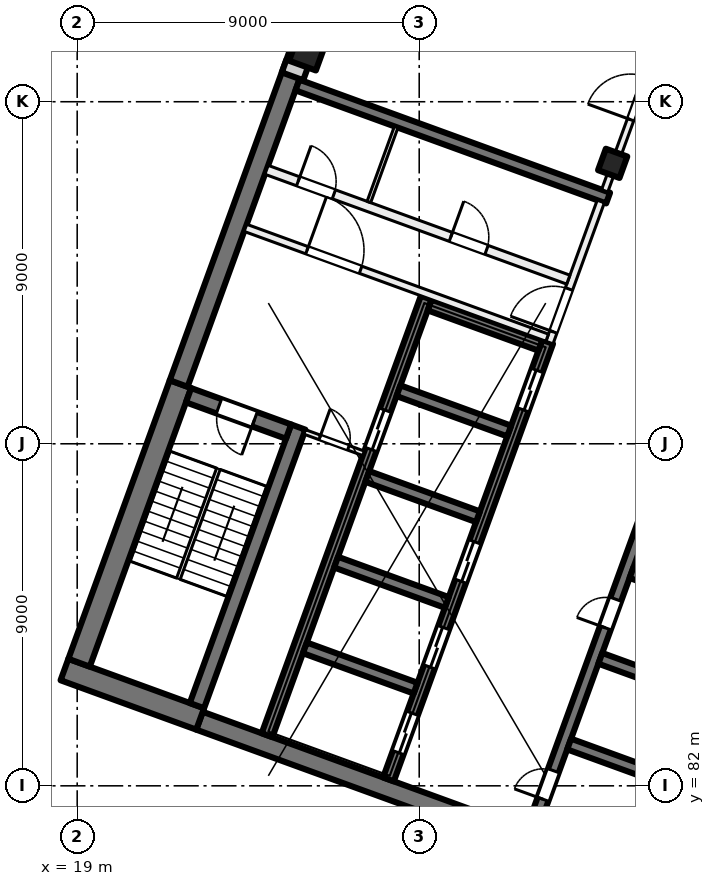
"""IFC4 building model, lengths in metres.
Left out: names, types, materials, properties, quantities, classifications, styles, units other than length and angle.
Written with IfcOpenShell. Run it as: python <this file> out.ifc"""

import sys

from ifc_helpers import new_model, si_unit, direction, frame, frame_2d, origin, origin_2d, place, context, subcontext, project, spatial, rectangle, extrude, element, fill, save


model = new_model("IFC4")
c1 = context("Model", 3, precision=1e-05, world=origin(), true_north=direction((0.0, 1.0)))
c2 = subcontext(c1, "Body", "Model", "MODEL_VIEW")
j1 = project(units=[si_unit("LENGTHUNIT", "METRE"), si_unit("PLANEANGLEUNIT", "RADIAN")], contexts=[c1])
p1 = place(None, origin())
s1 = spatial("IfcSite", under=j1, at=p1, CompositionType="ELEMENT")
p2 = place(p1, origin())
s2 = spatial("IfcBuilding", under=s1, at=p2, CompositionType="ELEMENT")
p3 = place(p2, frame((0.0, 0.0, 228.0)))
s3 = spatial("IfcBuildingStorey", under=s2, at=p3, CompositionType="ELEMENT", Elevation=228.0)
p4 = place(p3, frame((33.091, 98.379, 0.0), z_axis=(0.0, 0.0, 1.0), x_axis=(-0.342020143326, -0.939692620786, 0.0)))
e1 = element("IfcColumn", 1, at=p4, inside=s3, PredefinedType="COLUMN", context=c2, shape_type="SweptSolid", body=[
    extrude(rectangle(XDim=0.6, YDim=0.6, at=origin_2d()), origin(), (0.0, 0.0, 1.0), 4.0),
])
p5 = place(p3, frame((25.056, 101.303, 0.0), z_axis=(0.0, 0.0, 1.0), x_axis=(-0.342020143326, -0.939692620786, 0.0)))
e2 = element("IfcColumn", 2, at=p5, inside=s3, PredefinedType="COLUMN", context=c2, shape_type="SweptSolid", body=[
    extrude(rectangle(XDim=0.75, YDim=0.75, at=origin_2d()), origin(), (0.0, 0.0, 1.0), 4.0),
])
p6 = place(p3, frame((35.75, 78.788, 0.0), z_axis=(0.0, 0.0, 1.0), x_axis=(-0.939692894512, 0.342019391267, 0.0)))
e3 = element("IfcWall", 3, at=p6, inside=s3, PredefinedType="SHEAR", context=c2, shape_type="SweptSolid", body=[
    extrude(rectangle(XDim=14.4, YDim=0.5, at=frame_2d((7.2, 0.0))), origin(), (0.0, 0.0, 1.0), 4.0),
])
p7 = place(p3, frame((22.236, 83.76, 0.0), z_axis=(0.0, 0.0, 1.0), x_axis=(-0.939680822529, 0.342052557032, 0.0)))
e4 = element("IfcWall", 4, at=p7, inside=s3, PredefinedType="SHEAR", context=c2, shape_type="SweptSolid", body=[
    extrude(rectangle(XDim=3.8, YDim=0.6, at=frame_2d((1.9, 0.0))), origin(), (0.0, 0.0, 1.0), 4.0),
])
p8 = place(p3, frame((19.05, 85.239, 0.0), z_axis=(0.0, 0.0, 1.0), x_axis=(0.342016982193, 0.939693771338, 0.0)))
e5 = element("IfcWall", 5, at=p8, inside=s3, PredefinedType="SHEAR", context=c2, shape_type="SweptSolid", body=[
    extrude(rectangle(XDim=7.8, YDim=0.6, at=frame_2d((3.9, 0.0))), origin(), (0.0, 0.0, 1.0), 4.0),
])
p9 = place(p3, frame((21.67, 92.585, 0.0), z_axis=(0.0, 0.0, 1.0), x_axis=(0.342035714298, 0.93968695327, 0.0)))
e6 = element("IfcWall", 6, at=p9, inside=s3, PredefinedType="SHEAR", context=c2, shape_type="SweptSolid", body=[
    extrude(rectangle(XDim=8.975, YDim=0.5, at=frame_2d((4.488, 0.0))), origin(), (0.0, 0.0, 1.0), 4.0),
])
p10 = place(p3, frame((22.15, 84.11, 0.0), z_axis=(0.0, 0.0, 1.0), x_axis=(0.342016982193, 0.939693771338, 0.0)))
e7 = element("IfcWall", 7, at=p10, inside=s3, PredefinedType="SHEAR", context=c2, shape_type="SweptSolid", body=[
    extrude(rectangle(XDim=7.8, YDim=0.4, at=frame_2d((3.9, 0.0))), origin(), (0.0, 0.0, 1.0), 4.0),
])
p11 = place(p3, frame((24.562, 91.32, 0.0), z_axis=(0.0, 0.0, 1.0), x_axis=(-0.939717030584, 0.341953070509, 0.0)))
e8 = element("IfcWall", 8, at=p11, inside=s3, PredefinedType="SHEAR", context=c2, shape_type="SweptSolid", body=[
    extrude(rectangle(XDim=2.8, YDim=0.4, at=frame_2d((1.4, 0.0))), origin(), (0.0, 0.0, 1.0), 4.0),
])
p12 = place(p11, frame((0.95, 0.0, 0.0)))
e9 = element("IfcOpeningElement", 9, at=p12, cuts=e8, PredefinedType="OPENING", context=c2, shape_type="SweptSolid", body=[
    extrude(rectangle(XDim=1.0, YDim=2.1, at=frame_2d((0.5, 1.05))), frame((0.0, 0.21, 0.0), z_axis=(0.0, -1.0, 0.0), x_axis=(1.0, 0.0, 0.0)), (0.0, 0.0, 1.0), 0.42),
])
p13 = place(p3, frame((30.949, 80.801, 0.0), z_axis=(0.0, 0.0, 1.0), x_axis=(0.342016684409, 0.939693879721, 0.0)))
e10 = element("IfcWall", 10, at=p13, inside=s3, PredefinedType="SHEAR", context=c2, shape_type="SweptSolid", body=[
    extrude(rectangle(XDim=12.25, YDim=0.3, at=frame_2d((6.125, 0.0))), origin(), (0.0, 0.0, 1.0), 4.0),
])
p14 = place(p13, frame((0.9, 0.0, 0.0)))
e11 = element("IfcOpeningElement", 11, at=p14, cuts=e10, PredefinedType="OPENING", context=c2, shape_type="SweptSolid", body=[
    extrude(rectangle(XDim=0.8, YDim=2.1, at=frame_2d((0.4, 1.05))), frame((0.0, 0.16, 0.0), z_axis=(0.0, -1.0, 0.0), x_axis=(1.0, 0.0, 0.0)), (0.0, 0.0, 1.0), 0.32),
])
p15 = place(p13, frame((5.7, 0.0, 0.0)))
e12 = element("IfcOpeningElement", 12, at=p15, cuts=e10, PredefinedType="OPENING", context=c2, shape_type="SweptSolid", body=[
    extrude(rectangle(XDim=0.8, YDim=2.1, at=frame_2d((0.4, 1.05))), frame((0.0, 0.16, 0.0), z_axis=(0.0, -1.0, 0.0), x_axis=(1.0, 0.0, 0.0)), (0.0, 0.0, 1.0), 0.32),
])
p16 = place(p3, frame((34.858, 82.039, 0.0), z_axis=(0.0, 0.0, 1.0), x_axis=(-0.939689908313, 0.342027595692, 0.0)))
e13 = element("IfcWall", 13, at=p16, inside=s3, PredefinedType="SHEAR", context=c2, shape_type="SweptSolid", body=[
    extrude(rectangle(XDim=3.1, YDim=0.3, at=frame_2d((1.55, 0.0))), origin(), (0.0, 0.0, 1.0), 4.0),
])
p17 = place(p3, frame((35.679, 84.294, 0.0), z_axis=(0.0, 0.0, 1.0), x_axis=(-0.939706007505, 0.341983361377, 0.0)))
e14 = element("IfcWall", 14, at=p17, inside=s3, PredefinedType="SHEAR", context=c2, shape_type="SweptSolid", body=[
    extrude(rectangle(XDim=3.1, YDim=0.3, at=frame_2d((1.55, 0.0))), origin(), (0.0, 0.0, 1.0), 4.0),
])
p18 = place(p3, frame((36.5, 86.549, 0.0), z_axis=(0.0, 0.0, 1.0), x_axis=(-0.939689908313, 0.342027595692, 0.0)))
e15 = element("IfcWall", 15, at=p18, inside=s3, PredefinedType="SHEAR", context=c2, shape_type="SweptSolid", body=[
    extrude(rectangle(XDim=3.1, YDim=0.3, at=frame_2d((1.55, 0.0))), origin(), (0.0, 0.0, 1.0), 4.0),
])
p19 = place(p3, frame((27.191, 82.169, 0.0), z_axis=(0.0, 0.0, 1.0), x_axis=(0.342016684409, 0.939693879721, 0.0)))
e16 = element("IfcWall", 16, at=p19, inside=s3, PredefinedType="SHEAR", context=c2, shape_type="SweptSolid", body=[
    extrude(rectangle(XDim=12.25, YDim=0.3, at=frame_2d((6.125, 0.0))), origin(), (0.0, 0.0, 1.0), 4.0),
])
p20 = place(p19, frame((0.75, 0.0, 0.0)))
e17 = element("IfcOpeningElement", 17, at=p20, cuts=e16, PredefinedType="OPENING", context=c2, shape_type="SweptSolid", body=[
    extrude(rectangle(XDim=1.1, YDim=2.1, at=frame_2d((0.55, 1.05))), frame((0.0, 0.16, 0.0), z_axis=(0.0, -1.0, 0.0), x_axis=(1.0, 0.0, 0.0)), (0.0, 0.0, 1.0), 0.32),
])
p21 = place(p19, frame((3.15, 0.0, 0.0)))
e18 = element("IfcOpeningElement", 18, at=p21, cuts=e16, PredefinedType="OPENING", context=c2, shape_type="SweptSolid", body=[
    extrude(rectangle(XDim=1.1, YDim=2.1, at=frame_2d((0.55, 1.05))), frame((0.0, 0.16, 0.0), z_axis=(0.0, -1.0, 0.0), x_axis=(1.0, 0.0, 0.0)), (0.0, 0.0, 1.0), 0.32),
])
p22 = place(p19, frame((5.55, 0.0, 0.0)))
e19 = element("IfcOpeningElement", 19, at=p22, cuts=e16, PredefinedType="OPENING", context=c2, shape_type="SweptSolid", body=[
    extrude(rectangle(XDim=1.1, YDim=2.1, at=frame_2d((0.55, 1.05))), frame((0.0, 0.16, 0.0), z_axis=(0.0, -1.0, 0.0), x_axis=(1.0, 0.0, 0.0)), (0.0, 0.0, 1.0), 0.32),
])
p23 = place(p19, frame((10.35, 0.0, 0.0)))
e20 = element("IfcOpeningElement", 20, at=p23, cuts=e16, PredefinedType="OPENING", context=c2, shape_type="SweptSolid", body=[
    extrude(rectangle(XDim=1.1, YDim=2.1, at=frame_2d((0.55, 1.05))), frame((0.0, 0.16, 0.0), z_axis=(0.0, -1.0, 0.0), x_axis=(1.0, 0.0, 0.0)), (0.0, 0.0, 1.0), 0.32),
])
p24 = place(p3, frame((23.996, 83.332, 0.0), z_axis=(0.0, 0.0, 1.0), x_axis=(0.342016684409, 0.939693879721, 0.0)))
e21 = element("IfcWall", 21, at=p24, inside=s3, PredefinedType="SHEAR", context=c2, shape_type="SweptSolid", body=[
    extrude(rectangle(XDim=12.25, YDim=0.3, at=frame_2d((6.125, 0.0))), origin(), (0.0, 0.0, 1.0), 4.0),
])
p25 = place(p24, frame((8.0, 0.0, 0.0)))
e22 = element("IfcOpeningElement", 22, at=p25, cuts=e21, PredefinedType="OPENING", context=c2, shape_type="SweptSolid", body=[
    extrude(rectangle(XDim=1.1, YDim=2.1, at=frame_2d((0.55, 1.05))), frame((0.0, 0.16, 0.0), z_axis=(0.0, -1.0, 0.0), x_axis=(1.0, 0.0, 0.0)), (0.0, 0.0, 1.0), 0.32),
])
for number, where, z_axis, x_axis in (
    (23, (27.905, 84.57, 0.0), (0.0, 0.0, 1.0), (-0.94, 0.342, 0.0)),
    (24, (28.726, 86.825, 0.0), (0.0, 0.0, 1.0), (-0.94, 0.342, 0.0)),
    (25, (29.546, 89.08, 0.0), (0.0, 0.0, 1.0), (-0.94, 0.342, 0.0)),
):
    element("IfcWall", number, at=place(p3, frame(where, z_axis=z_axis, x_axis=x_axis)), inside=s3, PredefinedType="SHEAR", context=c2, shape_type="SweptSolid", body=[
        extrude(rectangle(XDim=3.1, YDim=0.3, at=frame_2d((1.55, 0.0))), origin(), (0.0, 0.0, 1.0), 4.0),
    ])
for number, where, z_axis, x_axis in (
    (26, (30.367, 91.336, 0.0), (0.0, 0.0, 1.0), (-0.94, 0.342, 0.0)),
    (27, (31.188, 93.591, 0.0), (0.0, 0.0, 1.0), (-0.94, 0.342, 0.0)),
):
    element("IfcWall", number, at=place(p3, frame(where, z_axis=z_axis, x_axis=x_axis)), inside=s3, PredefinedType="SHEAR", context=c2, shape_type="SweptSolid", body=[
        extrude(rectangle(XDim=3.1, YDim=0.3, at=frame_2d((1.55, 0.0))), origin(), (0.0, 0.0, 1.0), 4.0),
    ])
p26 = place(p3, frame((32.971, 97.465, 0.0), z_axis=(0.0, 0.0, 1.0), x_axis=(-0.939695066972, 0.34201342241, 0.0)))
e28 = element("IfcWall", 28, at=p26, inside=s3, PredefinedType="SHEAR", context=c2, shape_type="SweptSolid", body=[
    extrude(rectangle(XDim=8.7, YDim=0.3, at=frame_2d((4.35, 0.0))), origin(), (0.0, 0.0, 1.0), 4.0),
])
p27 = place(p3, frame((24.666, 100.669, 0.0), z_axis=(0.0, 0.0, 1.0), x_axis=(0.34201964167, 0.939692803373, 0.0)))
e29 = element("IfcWall", 29, at=p27, inside=s3, PredefinedType="SOLIDWALL", context=c2, shape_type="SweptSolid", body=[
    extrude(rectangle(XDim=32.884, YDim=0.6, at=frame_2d((16.442, 0.0))), origin(), (0.0, 0.0, 1.0), 3.625),
])
p28 = place(p27, frame((1.48, 0.0, 0.9)))
e30 = element("IfcOpeningElement", 30, at=p28, cuts=e29, PredefinedType="OPENING", context=c2, shape_type="SweptSolid", body=[
    extrude(rectangle(XDim=3.0, YDim=2.4, at=frame_2d((1.5, 1.2))), frame((0.0, 0.31, 0.0), z_axis=(0.0, -1.0, 0.0), x_axis=(1.0, 0.0, 0.0)), (0.0, 0.0, 1.0), 0.62),
])
p29 = place(p27, frame((5.98, 0.0, 0.9)))
e31 = element("IfcOpeningElement", 31, at=p29, cuts=e29, PredefinedType="OPENING", context=c2, shape_type="SweptSolid", body=[
    extrude(rectangle(XDim=3.0, YDim=2.4, at=frame_2d((1.5, 1.2))), frame((0.0, 0.31, 0.0), z_axis=(0.0, -1.0, 0.0), x_axis=(1.0, 0.0, 0.0)), (0.0, 0.0, 1.0), 0.62),
])
p30 = place(p27, frame((10.48, 0.0, 0.9)))
e32 = element("IfcOpeningElement", 32, at=p30, cuts=e29, PredefinedType="OPENING", context=c2, shape_type="SweptSolid", body=[
    extrude(rectangle(XDim=3.0, YDim=2.4, at=frame_2d((1.5, 1.2))), frame((0.0, 0.31, 0.0), z_axis=(0.0, -1.0, 0.0), x_axis=(1.0, 0.0, 0.0)), (0.0, 0.0, 1.0), 0.62),
])
p31 = place(p27, frame((14.98, 0.0, 0.9)))
e33 = element("IfcOpeningElement", 33, at=p31, cuts=e29, PredefinedType="OPENING", context=c2, shape_type="SweptSolid", body=[
    extrude(rectangle(XDim=3.0, YDim=2.4, at=frame_2d((1.5, 1.2))), frame((0.0, 0.31, 0.0), z_axis=(0.0, -1.0, 0.0), x_axis=(1.0, 0.0, 0.0)), (0.0, 0.0, 1.0), 0.62),
])
p32 = place(p27, frame((20.08, 0.0, 0.0)))
e34 = element("IfcOpeningElement", 34, at=p32, cuts=e29, PredefinedType="OPENING", context=c2, shape_type="SweptSolid", body=[
    extrude(rectangle(XDim=1.8, YDim=2.4, at=frame_2d((0.9, 1.2))), frame((0.0, 0.31, 0.0), z_axis=(0.0, -1.0, 0.0), x_axis=(1.0, 0.0, 0.0)), (0.0, 0.0, 1.0), 0.62),
])
p33 = place(p27, frame((23.98, 0.0, 0.9)))
e35 = element("IfcOpeningElement", 35, at=p33, cuts=e29, PredefinedType="OPENING", context=c2, shape_type="SweptSolid", body=[
    extrude(rectangle(XDim=3.0, YDim=2.4, at=frame_2d((1.5, 1.2))), frame((0.0, 0.31, 0.0), z_axis=(0.0, -1.0, 0.0), x_axis=(1.0, 0.0, 0.0)), (0.0, 0.0, 1.0), 0.62),
])
p34 = place(p27, frame((28.48, 0.0, 0.9)))
e36 = element("IfcOpeningElement", 36, at=p34, cuts=e29, PredefinedType="OPENING", context=c2, shape_type="SweptSolid", body=[
    extrude(rectangle(XDim=3.0, YDim=2.4, at=frame_2d((1.5, 1.2))), frame((0.0, 0.31, 0.0), z_axis=(0.0, -1.0, 0.0), x_axis=(1.0, 0.0, 0.0)), (0.0, 0.0, 1.0), 0.62),
])
p35 = place(p3, frame((31.427, 93.663, 0.0), z_axis=(0.0, 0.0, 1.0), x_axis=(0.342030870568, 0.93968871632, 0.0)))
e37 = element("IfcWall", 37, at=p35, inside=s3, PredefinedType="PARTITIONING", context=c2, shape_type="SweptSolid", body=[
    extrude(rectangle(XDim=3.95, YDim=0.2, at=frame_2d((1.975, 0.0))), origin(), (0.0, 0.0, 1.0), 3.625),
])
p36 = place(p35, frame((0.3, 0.0, 0.0)))
e38 = element("IfcOpeningElement", 38, at=p36, cuts=e37, PredefinedType="OPENING", context=c2, shape_type="SweptSolid", body=[
    extrude(rectangle(XDim=1.2, YDim=2.1, at=frame_2d((0.6, 1.05))), frame((0.0, 0.11, 0.0), z_axis=(0.0, -1.0, 0.0), x_axis=(1.0, 0.0, 0.0)), (0.0, 0.0, 1.0), 0.22),
])
p37 = place(p3, frame((23.427, 96.682, 0.0), z_axis=(0.0, 0.0, 1.0), x_axis=(0.939690465531, -0.342026064782, 0.0)))
e39 = element("IfcWall", 39, at=p37, inside=s3, PredefinedType="PARTITIONING", context=c2, shape_type="SweptSolid", body=[
    extrude(rectangle(XDim=8.45, YDim=0.2, at=frame_2d((4.225, 0.0))), origin(), (0.0, 0.0, 1.0), 3.625),
])
p38 = place(p37, frame((1.725, 0.0, 0.0)))
e40 = element("IfcOpeningElement", 40, at=p38, cuts=e39, PredefinedType="OPENING", context=c2, shape_type="SweptSolid", body=[
    extrude(rectangle(XDim=1.5, YDim=2.1, at=frame_2d((0.75, 1.05))), frame((0.0, 0.11, 0.0), z_axis=(0.0, -1.0, 0.0), x_axis=(1.0, 0.0, 0.0)), (0.0, 0.0, 1.0), 0.22),
])
p39 = place(p3, frame((23.983, 98.208, 0.0), z_axis=(0.0, 0.0, 1.0), x_axis=(0.939699751196, -0.342000552051, 0.0)))
e41 = element("IfcWall", 41, at=p39, inside=s3, PredefinedType="PARTITIONING", context=c2, shape_type="SweptSolid", body=[
    extrude(rectangle(XDim=8.45, YDim=0.25, at=frame_2d((4.225, 0.0))), origin(), (0.0, 0.0, 1.0), 3.625),
])
p40 = place(p39, frame((5.16, 0.0, 0.0)))
e42 = element("IfcOpeningElement", 42, at=p40, cuts=e41, PredefinedType="OPENING", context=c2, shape_type="SweptSolid", body=[
    extrude(rectangle(XDim=1.0, YDim=2.1, at=frame_2d((0.5, 1.05))), frame((0.0, 0.135, 0.0), z_axis=(0.0, -1.0, 0.0), x_axis=(1.0, 0.0, 0.0)), (0.0, 0.0, 1.0), 0.27),
])
p41 = place(p39, frame((0.885, 0.0, 0.0)))
e43 = element("IfcOpeningElement", 43, at=p41, cuts=e41, PredefinedType="OPENING", context=c2, shape_type="SweptSolid", body=[
    extrude(rectangle(XDim=1.0, YDim=2.1, at=frame_2d((0.5, 1.05))), frame((0.0, 0.135, 0.0), z_axis=(0.0, -1.0, 0.0), x_axis=(1.0, 0.0, 0.0)), (0.0, 0.0, 1.0), 0.27),
])
p42 = place(p3, frame((24.985, 91.312, 0.0), z_axis=(0.0, 0.0, 1.0), x_axis=(0.939719959755, -0.341945020783, 0.0)))
e44 = element("IfcWall", 44, at=p42, inside=s3, PredefinedType="PARTITIONING", context=c2, shape_type="SweptSolid", body=[
    extrude(rectangle(XDim=1.65, YDim=0.125, at=frame_2d((0.825, 0.0))), origin(), (0.0, 0.0, 1.0), 3.625),
])
p43 = place(p42, frame((0.425, 0.0, 0.0)))
e45 = element("IfcOpeningElement", 45, at=p43, cuts=e44, PredefinedType="OPENING", context=c2, shape_type="SweptSolid", body=[
    extrude(rectangle(XDim=0.8, YDim=2.1, at=frame_2d((0.4, 1.05))), frame((0.0, 0.073, 0.0), z_axis=(0.0, -1.0, 0.0), x_axis=(1.0, 0.0, 0.0)), (0.0, 0.0, 1.0), 0.145),
])
p44 = place(p3, frame((26.676, 97.362, 0.0), z_axis=(0.0, 0.0, 1.0), x_axis=(0.342023078919, 0.939691552312, 0.0)))
e46 = element("IfcWall", 46, at=p44, inside=s3, PredefinedType="PARTITIONING", context=c2, shape_type="SweptSolid", body=[
    extrude(rectangle(XDim=2.1, YDim=0.1, at=frame_2d((1.05, 0.0))), origin(), (0.0, 0.0, 1.0), 3.625),
])
p45 = place(p3, frame((32.881, 97.657, 0.0), z_axis=(0.0, 0.0, 1.0), x_axis=(0.342058204353, 0.939678766832, 0.0)))
e47 = element("IfcWall", 47, at=p45, inside=s3, PredefinedType="PARTITIONING", context=c2, shape_type="SweptSolid", body=[
    extrude(rectangle(XDim=5.163, YDim=0.175, at=frame_2d((2.581, 0.0))), origin(), (0.0, 0.0, 1.0), 3.625),
])
p46 = place(p45, frame((1.991, 0.0, 0.0)))
e48 = element("IfcOpeningElement", 48, at=p46, cuts=e47, PredefinedType="OPENING", context=c2, shape_type="SweptSolid", body=[
    extrude(rectangle(XDim=1.2, YDim=2.1, at=frame_2d((0.6, 1.05))), frame((0.0, 0.097, 0.0), z_axis=(0.0, -1.0, 0.0), x_axis=(1.0, 0.0, 0.0)), (0.0, 0.0, 1.0), 0.195),
])
p47 = place(p20, origin())
e49 = element("IfcDoor", 49, at=p47, inside=s3, OperationType="DOUBLE_DOOR_SLIDING", PredefinedType="DOOR", context=c2, shape_type="SweptSolid", body=[
    extrude(rectangle(XDim=1.1, YDim=2.1, at=frame_2d((0.55, 1.05))), frame((0.0, 0.025, 0.0), z_axis=(0.0, -1.0, 0.0), x_axis=(1.0, 0.0, 0.0)), (0.0, 0.0, 1.0), 0.05),
])
fill(e17, e49)
p48 = place(p21, origin())
e50 = element("IfcDoor", 50, at=p48, inside=s3, OperationType="DOUBLE_DOOR_SLIDING", PredefinedType="DOOR", context=c2, shape_type="SweptSolid", body=[
    extrude(rectangle(XDim=1.1, YDim=2.1, at=frame_2d((0.55, 1.05))), frame((0.0, 0.025, 0.0), z_axis=(0.0, -1.0, 0.0), x_axis=(1.0, 0.0, 0.0)), (0.0, 0.0, 1.0), 0.05),
])
fill(e18, e50)
p49 = place(p22, origin())
e51 = element("IfcDoor", 51, at=p49, inside=s3, OperationType="DOUBLE_DOOR_SLIDING", PredefinedType="DOOR", context=c2, shape_type="SweptSolid", body=[
    extrude(rectangle(XDim=1.1, YDim=2.1, at=frame_2d((0.55, 1.05))), frame((0.0, 0.025, 0.0), z_axis=(0.0, -1.0, 0.0), x_axis=(1.0, 0.0, 0.0)), (0.0, 0.0, 1.0), 0.05),
])
fill(e19, e51)
p50 = place(p23, origin())
e52 = element("IfcDoor", 52, at=p50, inside=s3, OperationType="DOUBLE_DOOR_SLIDING", PredefinedType="DOOR", context=c2, shape_type="SweptSolid", body=[
    extrude(rectangle(XDim=1.1, YDim=2.1, at=frame_2d((0.55, 1.05))), frame((0.0, 0.025, 0.0), z_axis=(0.0, -1.0, 0.0), x_axis=(1.0, 0.0, 0.0)), (0.0, 0.0, 1.0), 0.05),
])
fill(e20, e52)
p51 = place(p14, origin())
e53 = element("IfcDoor", 53, at=p51, inside=s3, OperationType="SINGLE_SWING_LEFT", PredefinedType="DOOR", context=c2, shape_type="SweptSolid", body=[
    extrude(rectangle(XDim=0.8, YDim=2.1, at=frame_2d((0.4, 1.05))), frame((0.0, 0.025, 0.0), z_axis=(0.0, -1.0, 0.0), x_axis=(1.0, 0.0, 0.0)), (0.0, 0.0, 1.0), 0.05),
])
fill(e11, e53)
p52 = place(p15, origin())
e54 = element("IfcDoor", 54, at=p52, inside=s3, OperationType="SINGLE_SWING_RIGHT", PredefinedType="DOOR", context=c2, shape_type="SweptSolid", body=[
    extrude(rectangle(XDim=0.8, YDim=2.1, at=frame_2d((0.4, 1.05))), frame((0.0, 0.025, 0.0), z_axis=(0.0, -1.0, 0.0), x_axis=(1.0, 0.0, 0.0)), (0.0, 0.0, 1.0), 0.05),
])
fill(e12, e54)
p53 = place(p36, origin())
e55 = element("IfcDoor", 55, at=p53, inside=s3, OperationType="DOUBLE_DOOR_SINGLE_SWING", PredefinedType="DOOR", context=c2, shape_type="SweptSolid", body=[
    extrude(rectangle(XDim=1.2, YDim=2.1, at=frame_2d((0.6, 1.05))), frame((0.0, 0.025, 0.0), z_axis=(0.0, -1.0, 0.0), x_axis=(1.0, 0.0, 0.0)), (0.0, 0.0, 1.0), 0.05),
])
fill(e38, e55)
p54 = place(p38, origin())
e56 = element("IfcDoor", 56, at=p54, inside=s3, OperationType="DOUBLE_DOOR_SINGLE_SWING", PredefinedType="DOOR", context=c2, shape_type="SweptSolid", body=[
    extrude(rectangle(XDim=1.5, YDim=2.1, at=frame_2d((0.75, 1.05))), frame((0.0, 0.025, 0.0), z_axis=(0.0, -1.0, 0.0), x_axis=(1.0, 0.0, 0.0)), (0.0, 0.0, 1.0), 0.05),
])
fill(e40, e56)
p55 = place(p12, origin())
e57 = element("IfcDoor", 57, at=p55, inside=s3, OperationType="SINGLE_SWING_LEFT", PredefinedType="DOOR", context=c2, shape_type="SweptSolid", body=[
    extrude(rectangle(XDim=1.0, YDim=2.1, at=frame_2d((0.5, 1.05))), frame((0.0, 0.025, 0.0), z_axis=(0.0, -1.0, 0.0), x_axis=(1.0, 0.0, 0.0)), (0.0, 0.0, 1.0), 0.05),
])
fill(e9, e57)
p56 = place(p43, origin())
e58 = element("IfcDoor", 58, at=p56, inside=s3, OperationType="SINGLE_SWING_RIGHT", PredefinedType="DOOR", context=c2, shape_type="SweptSolid", body=[
    extrude(rectangle(XDim=0.8, YDim=2.1, at=frame_2d((0.4, 1.05))), frame((0.0, 0.025, 0.0), z_axis=(0.0, -1.0, 0.0), x_axis=(1.0, 0.0, 0.0)), (0.0, 0.0, 1.0), 0.05),
])
fill(e45, e58)
p57 = place(p40, origin())
e59 = element("IfcDoor", 59, at=p57, inside=s3, OperationType="SINGLE_SWING_LEFT", PredefinedType="DOOR", context=c2, shape_type="SweptSolid", body=[
    extrude(rectangle(XDim=1.0, YDim=2.1, at=frame_2d((0.5, 1.05))), frame((0.0, 0.025, 0.0), z_axis=(0.0, -1.0, 0.0), x_axis=(1.0, 0.0, 0.0)), (0.0, 0.0, 1.0), 0.05),
])
fill(e42, e59)
p58 = place(p41, origin())
e60 = element("IfcDoor", 60, at=p58, inside=s3, OperationType="SINGLE_SWING_RIGHT", PredefinedType="DOOR", context=c2, shape_type="SweptSolid", body=[
    extrude(rectangle(XDim=1.0, YDim=2.1, at=frame_2d((0.5, 1.05))), frame((0.0, 0.025, 0.0), z_axis=(0.0, -1.0, 0.0), x_axis=(1.0, 0.0, 0.0)), (0.0, 0.0, 1.0), 0.05),
])
fill(e43, e60)
p59 = place(p25, origin())
e61 = element("IfcDoor", 61, at=p59, inside=s3, OperationType="DOUBLE_DOOR_SLIDING", PredefinedType="DOOR", context=c2, shape_type="SweptSolid", body=[
    extrude(rectangle(XDim=1.1, YDim=2.1, at=frame_2d((0.55, 1.05))), frame((0.0, 0.025, 0.0), z_axis=(0.0, -1.0, 0.0), x_axis=(1.0, 0.0, 0.0)), (0.0, 0.0, 1.0), 0.05),
])
fill(e22, e61)
p60 = place(p46, origin())
e62 = element("IfcDoor", 62, at=p60, inside=s3, OperationType="DOUBLE_DOOR_SINGLE_SWING", PredefinedType="DOOR", context=c2, shape_type="SweptSolid", body=[
    extrude(rectangle(XDim=1.2, YDim=2.1, at=frame_2d((0.6, 1.05))), frame((0.0, 0.025, 0.0), z_axis=(0.0, -1.0, 0.0), x_axis=(1.0, 0.0, 0.0)), (0.0, 0.0, 1.0), 0.05),
])
fill(e48, e62)
save(model, sys.argv[1])
